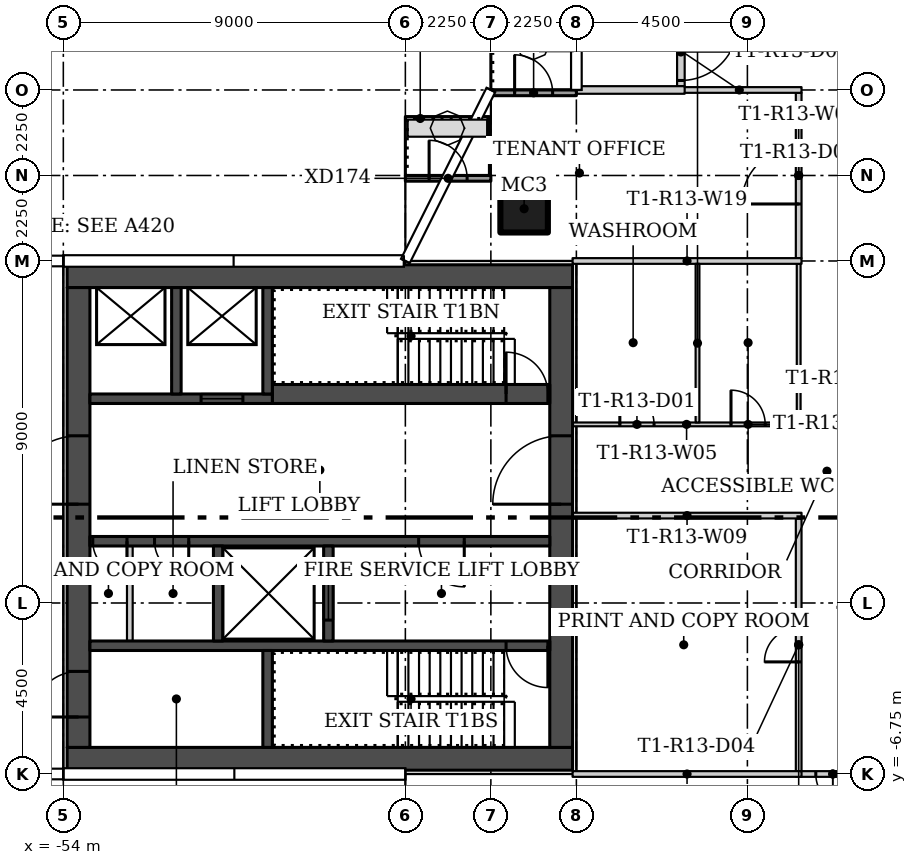
"""IFC4 building model, lengths in metres.
Left out: names, types, materials, properties, quantities, classifications, styles, units other than length and angle.
Written with IfcOpenShell. Run it as: python <this file> out.ifc"""

import sys

from ifc_helpers import new_model, si_unit, direction, frame, frame_2d, origin, origin_2d, place, context, subcontext, project, spatial, rectangle, hollow_rectangle, extrude, element, fill, save


model = new_model("IFC4")
c1 = context("Model", 3, precision=1e-05, world=origin(), true_north=direction((0.0, 1.0)))
c2 = subcontext(c1, "Body", "Model", "MODEL_VIEW")
j1 = project(units=[si_unit("LENGTHUNIT", "METRE"), si_unit("PLANEANGLEUNIT", "RADIAN")], contexts=[c1])
p1 = place(None, origin())
s1 = spatial("IfcSite", under=j1, at=p1, CompositionType="ELEMENT")
p2 = place(p1, origin())
s2 = spatial("IfcBuilding", under=s1, at=p2, CompositionType="ELEMENT")
p3 = place(p2, frame((0.0, 0.0, 120.9)))
s3 = spatial("IfcBuildingStorey", under=s2, at=p3, CompositionType="ELEMENT", Elevation=120.9)
p4 = place(p3, frame((-41.875, 8.125, 0.0)))
e1 = element("IfcColumn", 1, at=p4, inside=s3, PredefinedType="COLUMN", context=c2, shape_type="SweptSolid", body=[
    extrude(hollow_rectangle(XDim=1.25, YDim=1.25, WallThickness=0.05, at=origin_2d()), origin(), (0.0, 0.0, 1.0), 3.55),
])
p5 = place(p3, frame((-40.6, 2.45, 0.0)))
e2 = element("IfcWall", 2, at=p5, inside=s3, PredefinedType="PARTITIONING", context=c2, shape_type="SweptSolid", body=[
    extrude(rectangle(XDim=6.0, YDim=0.1, at=frame_2d((3.0, 0.0))), origin(), (0.0, 0.0, 1.0), 3.55),
])
p6 = place(p5, frame((1.244, 0.0, 0.0)))
e3 = element("IfcOpeningElement", 3, at=p6, cuts=e2, PredefinedType="OPENING", context=c2, shape_type="SweptSolid", body=[
    extrude(rectangle(XDim=0.9, YDim=2.1, at=frame_2d((0.45, 1.05))), frame((0.0, 0.06, 0.0), z_axis=(0.0, -1.0, 0.0), x_axis=(1.0, 0.0, 0.0)), (0.0, 0.0, 1.0), 0.12),
])
p7 = place(p5, frame((4.168, 0.0, 0.0)))
e4 = element("IfcOpeningElement", 4, at=p7, cuts=e2, PredefinedType="OPENING", context=c2, shape_type="SweptSolid", body=[
    extrude(rectangle(XDim=0.9, YDim=2.1, at=frame_2d((0.45, 1.05))), frame((0.0, 0.06, 0.0), z_axis=(0.0, -1.0, 0.0), x_axis=(1.0, 0.0, 0.0)), (0.0, 0.0, 1.0), 0.12),
])
p8 = place(p3, frame((-34.65, 2.5, 0.0), z_axis=(0.0, 0.0, 1.0), x_axis=(0.0, 1.0, 0.0)))
e5 = element("IfcWall", 5, at=p8, inside=s3, PredefinedType="PARTITIONING", context=c2, shape_type="SweptSolid", body=[
    extrude(rectangle(XDim=4.175, YDim=0.1, at=frame_2d((2.087, 0.0))), origin(), (0.0, 0.0, 1.0), 3.55),
])
p9 = place(p3, frame((-34.65, -6.675, 0.0), z_axis=(0.0, 0.0, 1.0), x_axis=(0.0, 1.0, 0.0)))
e6 = element("IfcWall", 6, at=p9, inside=s3, PredefinedType="PARTITIONING", context=c2, shape_type="SweptSolid", body=[
    extrude(rectangle(XDim=6.65, YDim=0.15, at=frame_2d((3.325, 0.0))), origin(), (0.0, 0.0, 1.0), 3.55),
])
p10 = place(p9, frame((2.875, 0.0, 0.0)))
e7 = element("IfcOpeningElement", 7, at=p10, cuts=e6, PredefinedType="OPENING", context=c2, shape_type="SweptSolid", body=[
    extrude(rectangle(XDim=0.9, YDim=2.1, at=frame_2d((0.45, 1.05))), frame((0.0, 0.085, 0.0), z_axis=(0.0, -1.0, 0.0), x_axis=(1.0, 0.0, 0.0)), (0.0, 0.0, 1.0), 0.17),
])
p11 = place(p3, frame((-34.65, 6.825, 0.0), z_axis=(0.0, 0.0, 1.0), x_axis=(0.0, 1.0, 0.0)))
e8 = element("IfcWall", 8, at=p11, inside=s3, PredefinedType="PARTITIONING", context=c2, shape_type="SweptSolid", body=[
    extrude(rectangle(XDim=4.35, YDim=0.15, at=frame_2d((2.175, 0.0))), origin(), (0.0, 0.0, 1.0), 3.55),
])
p12 = place(p11, frame((1.425, 0.0, 0.0)))
e9 = element("IfcOpeningElement", 9, at=p12, cuts=e8, PredefinedType="OPENING", context=c2, shape_type="SweptSolid", body=[
    extrude(rectangle(XDim=1.5, YDim=2.1, at=frame_2d((0.75, 1.05))), frame((0.0, 0.085, 0.0), z_axis=(0.0, -1.0, 0.0), x_axis=(1.0, 0.0, 0.0)), (0.0, 0.0, 1.0), 0.17),
])
p13 = place(p3, frame((-34.575, 0.05, 0.0), z_axis=(0.0, 0.0, 1.0), x_axis=(-1.0, 0.0, 0.0)))
e10 = element("IfcWall", 10, at=p13, inside=s3, PredefinedType="PARTITIONING", context=c2, shape_type="SweptSolid", body=[
    extrude(rectangle(XDim=6.025, YDim=0.15, at=frame_2d((3.012, 0.0))), origin(), (0.0, 0.0, 1.0), 3.55),
])
p14 = place(p3, frame((-34.575, 11.25, 0.0), z_axis=(0.0, 0.0, 1.0), x_axis=(-1.0, 0.0, 0.0)))
e11 = element("IfcWall", 11, at=p14, inside=s3, PredefinedType="PARTITIONING", context=c2, shape_type="SweptSolid", body=[
    extrude(rectangle(XDim=3.275, YDim=0.15, at=frame_2d((1.637, 0.0))), origin(), (0.0, 0.0, 1.0), 3.55),
])
p15 = place(p3, frame((-37.75, 13.15, 0.0), z_axis=(0.0, 0.0, 1.0), x_axis=(0.0, -1.0, 0.0)))
e12 = element("IfcWall", 12, at=p15, inside=s3, PredefinedType="PARTITIONING", context=c2, shape_type="SweptSolid", body=[
    extrude(rectangle(XDim=1.8, YDim=0.2, at=frame_2d((0.9, 0.0))), origin(), (0.0, 0.0, 1.0), 3.55),
])
p16 = place(p15, frame((0.15, 0.0, 0.0)))
e13 = element("IfcOpeningElement", 13, at=p16, cuts=e12, PredefinedType="OPENING", context=c2, shape_type="SweptSolid", body=[
    extrude(rectangle(XDim=1.5, YDim=2.4, at=frame_2d((0.75, 1.2))), frame((0.0, 0.11, 0.0), z_axis=(0.0, -1.0, 0.0), x_axis=(1.0, 0.0, 0.0)), (0.0, 0.0, 1.0), 0.22),
])
p17 = place(p3, frame((-32.787, -6.75, 0.0), z_axis=(0.0, 0.0, 1.0), x_axis=(-1.0, 0.0, 0.0)))
e14 = element("IfcWall", 14, at=p17, inside=s3, PredefinedType="PARTITIONING", context=c2, shape_type="SweptSolid", body=[
    extrude(rectangle(XDim=1.938, YDim=0.15, at=frame_2d((0.969, 0.0))), origin(), (0.0, 0.0, 1.0), 3.55),
])
p18 = place(p17, frame((0.513, 0.0, 0.0)))
e15 = element("IfcOpeningElement", 15, at=p18, cuts=e14, PredefinedType="OPENING", context=c2, shape_type="SweptSolid", body=[
    extrude(rectangle(XDim=0.9, YDim=2.1, at=frame_2d((0.45, 1.05))), frame((0.0, 0.085, 0.0), z_axis=(0.0, -1.0, 0.0), x_axis=(1.0, 0.0, 0.0)), (0.0, 0.0, 1.0), 0.17),
])
p19 = place(p3, frame((-34.575, 6.75, 0.0), z_axis=(0.0, 0.0, 1.0), x_axis=(-1.0, 0.0, 0.0)))
e16 = element("IfcWall", 16, at=p19, inside=s3, PredefinedType="PARTITIONING", context=c2, shape_type="SweptSolid", body=[
    extrude(rectangle(XDim=6.025, YDim=0.15, at=frame_2d((3.012, 0.0))), origin(), (0.0, 0.0, 1.0), 3.55),
])
p20 = place(p3, frame((-40.6, -6.75, 0.0)))
e17 = element("IfcWall", 17, at=p20, inside=s3, PredefinedType="PARTITIONING", context=c2, shape_type="SweptSolid", body=[
    extrude(rectangle(XDim=6.025, YDim=0.15, at=frame_2d((3.012, 0.0))), origin(), (0.0, 0.0, 1.0), 3.55),
])
p21 = place(p3, frame((-37.312, 2.5, 0.0), z_axis=(0.0, 0.0, 1.0), x_axis=(0.0, 1.0, 0.0)))
e18 = element("IfcWall", 18, at=p21, inside=s3, PredefinedType="PARTITIONING", context=c2, shape_type="SweptSolid", body=[
    extrude(rectangle(XDim=4.175, YDim=0.1, at=frame_2d((2.087, 0.0))), origin(), (0.0, 0.0, 1.0), 3.55),
])
p22 = place(p3, frame((-37.65, 11.25, 0.0), z_axis=(0.0, 0.0, 1.0), x_axis=(-1.0, 0.0, 0.0)))
e19 = element("IfcWall", 19, at=p22, inside=s3, PredefinedType="PARTITIONING", context=c2, shape_type="SweptSolid", body=[
    extrude(rectangle(XDim=2.85, YDim=0.2, at=frame_2d((1.425, 0.0))), origin(), (0.0, 0.0, 1.0), 3.55),
])
p23 = place(p3, frame((-42.75, 11.175, 0.0)))
e20 = element("IfcWall", 20, at=p23, inside=s3, PredefinedType="SOLIDWALL", context=c2, shape_type="SweptSolid", body=[
    extrude(rectangle(XDim=2.25, YDim=0.15, at=frame_2d((1.125, 0.0))), origin(), (0.0, 0.0, 1.0), 3.45),
])
p24 = place(p23, frame((0.625, 0.0, 0.0)))
e21 = element("IfcOpeningElement", 21, at=p24, cuts=e20, PredefinedType="OPENING", context=c2, shape_type="SweptSolid", body=[
    extrude(rectangle(XDim=1.0, YDim=2.4, at=frame_2d((0.5, 1.2))), frame((0.0, 0.085, 0.0), z_axis=(0.0, -1.0, 0.0), x_axis=(1.0, 0.0, 0.0)), (0.0, 0.0, 1.0), 0.17),
])
p25 = place(p3, frame((-45.0, 8.925, 0.0)))
e22 = element("IfcWall", 22, at=p25, inside=s3, PredefinedType="SOLIDWALL", context=c2, shape_type="SweptSolid", body=[
    extrude(rectangle(XDim=2.25, YDim=0.15, at=frame_2d((1.125, 0.0))), origin(), (0.0, 0.0, 1.0), 3.45),
])
p26 = place(p25, frame((0.625, 0.0, 0.0)))
e23 = element("IfcOpeningElement", 23, at=p26, cuts=e22, PredefinedType="OPENING", context=c2, shape_type="SweptSolid", body=[
    extrude(rectangle(XDim=1.0, YDim=2.4, at=frame_2d((0.5, 1.2))), frame((0.0, 0.085, 0.0), z_axis=(0.0, -1.0, 0.0), x_axis=(1.0, 0.0, 0.0)), (0.0, 0.0, 1.0), 0.17),
])
for number, where, z_axis, x_axis in (
    (24, (-40.6, -6.35, 0.0), (0.0, 0.0, 1.0), (-1.0, 0.0, 0.0)),
    (25, (-40.6, 6.35, 0.0), (0.0, 0.0, 1.0), (-1.0, 0.0, 0.0)),
):
    element("IfcWall", number, at=place(p3, frame(where, z_axis=z_axis, x_axis=x_axis)), inside=s3, PredefinedType="SHEAR", context=c2, shape_type="SweptSolid", body=[
        extrude(rectangle(XDim=13.3, YDim=0.6, at=frame_2d((6.65, 0.0))), origin(), (0.0, 0.0, 1.0), 3.55),
    ])
p27 = place(p3, frame((-40.9, -6.05, 0.0), z_axis=(0.0, 0.0, 1.0), x_axis=(0.0, 1.0, 0.0)))
e26 = element("IfcWall", 26, at=p27, inside=s3, PredefinedType="SHEAR", context=c2, shape_type="SweptSolid", body=[
    extrude(rectangle(XDim=12.1, YDim=0.6, at=frame_2d((6.05, 0.0))), origin(), (0.0, 0.0, 1.0), 3.55),
])
p28 = place(p27, frame((6.4, 0.0, 0.0)))
e27 = element("IfcOpeningElement", 27, at=p28, cuts=e26, PredefinedType="OPENING", context=c2, shape_type="SweptSolid", body=[
    extrude(rectangle(XDim=1.8, YDim=2.4, at=frame_2d((0.9, 1.2))), frame((0.0, 0.31, 0.0), z_axis=(0.0, -1.0, 0.0), x_axis=(1.0, 0.0, 0.0)), (0.0, 0.0, 1.0), 0.62),
])
p29 = place(p3, frame((-53.6, -6.05, 0.0), z_axis=(0.0, 0.0, 1.0), x_axis=(0.0, 1.0, 0.0)))
e28 = element("IfcWall", 28, at=p29, inside=s3, PredefinedType="SHEAR", context=c2, shape_type="SweptSolid", body=[
    extrude(rectangle(XDim=12.1, YDim=0.6, at=frame_2d((6.05, 0.0))), origin(), (0.0, 0.0, 1.0), 3.55),
])
p30 = place(p29, frame((0.8, 0.0, 0.0)))
e29 = element("IfcOpeningElement", 29, at=p30, cuts=e28, PredefinedType="OPENING", context=c2, shape_type="SweptSolid", body=[
    extrude(rectangle(XDim=1.2, YDim=2.1, at=frame_2d((0.6, 1.05))), frame((0.0, 0.31, 0.0), z_axis=(0.0, -1.0, 0.0), x_axis=(1.0, 0.0, 0.0)), (0.0, 0.0, 1.0), 0.62),
])
p31 = place(p29, frame((6.4, 0.0, 0.0)))
e30 = element("IfcOpeningElement", 30, at=p31, cuts=e28, PredefinedType="OPENING", context=c2, shape_type="SweptSolid", body=[
    extrude(rectangle(XDim=1.8, YDim=2.4, at=frame_2d((0.9, 1.2))), frame((0.0, 0.31, 0.0), z_axis=(0.0, -1.0, 0.0), x_axis=(1.0, 0.0, 0.0)), (0.0, 0.0, 1.0), 0.62),
])
p32 = place(p3, frame((-41.2, -3.375, 0.0), z_axis=(0.0, 0.0, 1.0), x_axis=(-1.0, 0.0, 0.0)))
e31 = element("IfcWall", 31, at=p32, inside=s3, PredefinedType="SHEAR", context=c2, shape_type="SweptSolid", body=[
    extrude(rectangle(XDim=12.1, YDim=0.25, at=frame_2d((6.05, 0.0))), origin(), (0.0, 0.0, 1.0), 3.55),
])
p33 = place(p32, frame((0.05, 0.0, 0.0)))
e32 = element("IfcOpeningElement", 32, at=p33, cuts=e31, PredefinedType="OPENING", context=c2, shape_type="SweptSolid", body=[
    extrude(rectangle(XDim=1.1, YDim=2.1, at=frame_2d((0.55, 1.05))), frame((0.0, 0.135, 0.0), z_axis=(0.0, -1.0, 0.0), x_axis=(1.0, 0.0, 0.0)), (0.0, 0.0, 1.0), 0.27),
])
p34 = place(p3, frame((-48.625, -6.05, 0.0), z_axis=(0.0, 0.0, 1.0), x_axis=(0.0, 1.0, 0.0)))
e33 = element("IfcWall", 33, at=p34, inside=s3, PredefinedType="SHEAR", context=c2, shape_type="SweptSolid", body=[
    extrude(rectangle(XDim=2.55, YDim=0.25, at=frame_2d((1.275, 0.0))), origin(), (0.0, 0.0, 1.0), 3.55),
])
p35 = place(p3, frame((-41.2, -0.625, 0.0), z_axis=(0.0, 0.0, 1.0), x_axis=(-1.0, 0.0, 0.0)))
e34 = element("IfcWall", 34, at=p35, inside=s3, PredefinedType="SHEAR", context=c2, shape_type="SweptSolid", body=[
    extrude(rectangle(XDim=12.1, YDim=0.25, at=frame_2d((6.05, 0.0))), origin(), (0.0, 0.0, 1.0), 3.55),
])
p36 = place(p35, frame((2.25, 0.0, 0.0)))
e35 = element("IfcOpeningElement", 35, at=p36, cuts=e34, PredefinedType="OPENING", context=c2, shape_type="SweptSolid", body=[
    extrude(rectangle(XDim=1.2, YDim=2.1, at=frame_2d((0.6, 1.05))), frame((0.0, 0.135, 0.0), z_axis=(0.0, -1.0, 0.0), x_axis=(1.0, 0.0, 0.0)), (0.0, 0.0, 1.0), 0.27),
])
p37 = place(p35, frame((9.5, 0.0, 0.0)))
e36 = element("IfcOpeningElement", 36, at=p37, cuts=e34, PredefinedType="OPENING", context=c2, shape_type="SweptSolid", body=[
    extrude(rectangle(XDim=0.9, YDim=2.1, at=frame_2d((0.45, 1.05))), frame((0.0, 0.135, 0.0), z_axis=(0.0, -1.0, 0.0), x_axis=(1.0, 0.0, 0.0)), (0.0, 0.0, 1.0), 0.27),
])
p38 = place(p35, frame((11.125, 0.0, 0.0)))
e37 = element("IfcOpeningElement", 37, at=p38, cuts=e34, PredefinedType="OPENING", context=c2, shape_type="SweptSolid", body=[
    extrude(rectangle(XDim=0.9, YDim=2.1, at=frame_2d((0.45, 1.05))), frame((0.0, 0.135, 0.0), z_axis=(0.0, -1.0, 0.0), x_axis=(1.0, 0.0, 0.0)), (0.0, 0.0, 1.0), 0.27),
])
p39 = place(p3, frame((-47.025, -3.25, 0.0), z_axis=(0.0, 0.0, 1.0), x_axis=(0.0, 1.0, 0.0)))
e38 = element("IfcWall", 38, at=p39, inside=s3, PredefinedType="SHEAR", context=c2, shape_type="SweptSolid", body=[
    extrude(rectangle(XDim=2.5, YDim=0.25, at=frame_2d((1.25, 0.0))), origin(), (0.0, 0.0, 1.0), 3.55),
])
p40 = place(p39, frame((0.55, 0.0, 0.0)))
e39 = element("IfcOpeningElement", 39, at=p40, cuts=e38, PredefinedType="OPENING", context=c2, shape_type="SweptSolid", body=[
    extrude(rectangle(XDim=1.4, YDim=2.4, at=frame_2d((0.7, 1.2))), frame((0.0, 0.135, 0.0), z_axis=(0.0, -1.0, 0.0), x_axis=(1.0, 0.0, 0.0)), (0.0, 0.0, 1.0), 0.27),
])
p41 = place(p3, frame((-49.925, -3.25, 0.0), z_axis=(0.0, 0.0, 1.0), x_axis=(0.0, 1.0, 0.0)))
e40 = element("IfcWall", 40, at=p41, inside=s3, PredefinedType="SHEAR", context=c2, shape_type="SweptSolid", body=[
    extrude(rectangle(XDim=2.5, YDim=0.25, at=frame_2d((1.25, 0.0))), origin(), (0.0, 0.0, 1.0), 3.55),
])
p42 = place(p3, frame((-52.25, -3.25, 0.0), z_axis=(0.0, 0.0, 1.0), x_axis=(0.0, 1.0, 0.0)))
e41 = element("IfcWall", 41, at=p42, inside=s3, PredefinedType="PARTITIONING", context=c2, shape_type="SweptSolid", body=[
    extrude(rectangle(XDim=2.5, YDim=0.15, at=frame_2d((1.25, 0.0))), origin(), (0.0, 0.0, 1.0), 3.55),
])
p43 = place(p3, frame((-48.5, 3.25, 0.0)))
e42 = element("IfcWall", 42, at=p43, inside=s3, PredefinedType="SHEAR", context=c2, shape_type="SweptSolid", body=[
    extrude(rectangle(XDim=7.3, YDim=0.5, at=frame_2d((3.65, 0.0))), origin(), (0.0, 0.0, 1.0), 3.55),
])
p44 = place(p43, frame((6.15, 0.0, 0.0)))
e43 = element("IfcOpeningElement", 43, at=p44, cuts=e42, PredefinedType="OPENING", context=c2, shape_type="SweptSolid", body=[
    extrude(rectangle(XDim=1.1, YDim=2.1, at=frame_2d((0.55, 1.05))), frame((0.0, 0.26, 0.0), z_axis=(0.0, -1.0, 0.0), x_axis=(1.0, 0.0, 0.0)), (0.0, 0.0, 1.0), 0.52),
])
p45 = place(p3, frame((-48.5, 3.125, 0.0), z_axis=(0.0, 0.0, 1.0), x_axis=(-1.0, 0.0, 0.0)))
e44 = element("IfcWall", 44, at=p45, inside=s3, PredefinedType="SHEAR", context=c2, shape_type="SweptSolid", body=[
    extrude(rectangle(XDim=4.8, YDim=0.25, at=frame_2d((2.4, 0.0))), origin(), (0.0, 0.0, 1.0), 3.55),
])
p46 = place(p45, frame((0.775, 0.0, 0.0)))
e45 = element("IfcOpeningElement", 45, at=p46, cuts=e44, PredefinedType="OPENING", context=c2, shape_type="SweptSolid", body=[
    extrude(rectangle(XDim=1.1, YDim=2.1, at=frame_2d((0.55, 1.05))), frame((0.0, 0.135, 0.0), z_axis=(0.0, -1.0, 0.0), x_axis=(1.0, 0.0, 0.0)), (0.0, 0.0, 1.0), 0.27),
])
for number, where, z_axis, x_axis in (
    (46, (-48.625, 3.25, 0.0), (0.0, 0.0, 1.0), (0.0, 1.0, 0.0)),
    (47, (-51.025, 3.25, 0.0), (0.0, 0.0, 1.0), (0.0, 1.0, 0.0)),
):
    element("IfcWall", number, at=place(p3, frame(where, z_axis=z_axis, x_axis=x_axis)), inside=s3, PredefinedType="SHEAR", context=c2, shape_type="SweptSolid", body=[
        extrude(rectangle(XDim=2.8, YDim=0.25, at=frame_2d((1.4, 0.0))), origin(), (0.0, 0.0, 1.0), 3.55),
    ])
p47 = place(p6, origin())
e48 = element("IfcDoor", 48, at=p47, inside=s3, OperationType="SINGLE_SWING_LEFT", PredefinedType="DOOR", context=c2, shape_type="SweptSolid", body=[
    extrude(rectangle(XDim=0.9, YDim=2.1, at=frame_2d((0.45, 1.05))), frame((0.0, 0.025, 0.0), z_axis=(0.0, -1.0, 0.0), x_axis=(1.0, 0.0, 0.0)), (0.0, 0.0, 1.0), 0.05),
])
fill(e3, e48)
p48 = place(p7, origin())
e49 = element("IfcDoor", 49, at=p48, inside=s3, OperationType="SINGLE_SWING_LEFT", PredefinedType="DOOR", context=c2, shape_type="SweptSolid", body=[
    extrude(rectangle(XDim=0.9, YDim=2.1, at=frame_2d((0.45, 1.05))), frame((0.0, 0.025, 0.0), z_axis=(0.0, -1.0, 0.0), x_axis=(1.0, 0.0, 0.0)), (0.0, 0.0, 1.0), 0.05),
])
fill(e4, e49)
p49 = place(p16, origin())
e50 = element("IfcDoor", 50, at=p49, inside=s3, OperationType="DOUBLE_DOOR_SINGLE_SWING", PredefinedType="DOOR", context=c2, shape_type="SweptSolid", body=[
    extrude(rectangle(XDim=1.5, YDim=2.4, at=frame_2d((0.75, 1.2))), frame((0.0, 0.025, 0.0), z_axis=(0.0, -1.0, 0.0), x_axis=(1.0, 0.0, 0.0)), (0.0, 0.0, 1.0), 0.05),
])
fill(e13, e50)
p50 = place(p10, origin())
e51 = element("IfcDoor", 51, at=p50, inside=s3, OperationType="SINGLE_SWING_RIGHT", PredefinedType="DOOR", context=c2, shape_type="SweptSolid", body=[
    extrude(rectangle(XDim=0.9, YDim=2.1, at=frame_2d((0.45, 1.05))), frame((0.0, 0.025, 0.0), z_axis=(0.0, -1.0, 0.0), x_axis=(1.0, 0.0, 0.0)), (0.0, 0.0, 1.0), 0.05),
])
fill(e7, e51)
p51 = place(p12, origin())
e52 = element("IfcDoor", 52, at=p51, inside=s3, OperationType="DOUBLE_DOOR_SINGLE_SWING", PredefinedType="DOOR", context=c2, shape_type="SweptSolid", body=[
    extrude(rectangle(XDim=1.5, YDim=2.1, at=frame_2d((0.75, 1.05))), frame((0.0, 0.025, 0.0), z_axis=(0.0, -1.0, 0.0), x_axis=(1.0, 0.0, 0.0)), (0.0, 0.0, 1.0), 0.05),
])
fill(e9, e52)
p52 = place(p18, origin())
e53 = element("IfcDoor", 53, at=p52, inside=s3, OperationType="SINGLE_SWING_RIGHT", PredefinedType="DOOR", context=c2, shape_type="SweptSolid", body=[
    extrude(rectangle(XDim=0.9, YDim=2.1, at=frame_2d((0.45, 1.05))), frame((0.0, 0.025, 0.0), z_axis=(0.0, -1.0, 0.0), x_axis=(1.0, 0.0, 0.0)), (0.0, 0.0, 1.0), 0.05),
])
fill(e15, e53)
p53 = place(p24, origin())
e54 = element("IfcDoor", 54, at=p53, inside=s3, OperationType="SINGLE_SWING_LEFT", PredefinedType="DOOR", context=c2, shape_type="SweptSolid", body=[
    extrude(rectangle(XDim=1.0, YDim=2.4, at=frame_2d((0.5, 1.2))), frame((0.0, 0.025, 0.0), z_axis=(0.0, -1.0, 0.0), x_axis=(1.0, 0.0, 0.0)), (0.0, 0.0, 1.0), 0.05),
])
fill(e21, e54)
p54 = place(p26, origin())
e55 = element("IfcDoor", 55, at=p54, inside=s3, OperationType="SINGLE_SWING_RIGHT", PredefinedType="DOOR", context=c2, shape_type="SweptSolid", body=[
    extrude(rectangle(XDim=1.0, YDim=2.4, at=frame_2d((0.5, 1.2))), frame((0.0, 0.025, 0.0), z_axis=(0.0, -1.0, 0.0), x_axis=(1.0, 0.0, 0.0)), (0.0, 0.0, 1.0), 0.05),
])
fill(e23, e55)
p55 = place(p28, origin())
e56 = element("IfcDoor", 56, at=p55, inside=s3, OperationType="DOUBLE_DOOR_SINGLE_SWING", PredefinedType="DOOR", context=c2, shape_type="SweptSolid", body=[
    extrude(rectangle(XDim=1.8, YDim=2.4, at=frame_2d((0.9, 1.2))), frame((0.0, 0.025, 0.0), z_axis=(0.0, -1.0, 0.0), x_axis=(1.0, 0.0, 0.0)), (0.0, 0.0, 1.0), 0.05),
])
fill(e27, e56)
p56 = place(p30, origin())
e57 = element("IfcDoor", 57, at=p56, inside=s3, OperationType="SINGLE_SWING_LEFT", PredefinedType="DOOR", context=c2, shape_type="SweptSolid", body=[
    extrude(rectangle(XDim=1.2, YDim=2.1, at=frame_2d((0.6, 1.05))), frame((0.0, 0.025, 0.0), z_axis=(0.0, -1.0, 0.0), x_axis=(1.0, 0.0, 0.0)), (0.0, 0.0, 1.0), 0.05),
])
fill(e29, e57)
p57 = place(p31, origin())
e58 = element("IfcDoor", 58, at=p57, inside=s3, OperationType="DOUBLE_DOOR_SINGLE_SWING", PredefinedType="DOOR", context=c2, shape_type="SweptSolid", body=[
    extrude(rectangle(XDim=1.8, YDim=2.4, at=frame_2d((0.9, 1.2))), frame((0.0, 0.025, 0.0), z_axis=(0.0, -1.0, 0.0), x_axis=(1.0, 0.0, 0.0)), (0.0, 0.0, 1.0), 0.05),
])
fill(e30, e58)
p58 = place(p33, origin())
e59 = element("IfcDoor", 59, at=p58, inside=s3, OperationType="SINGLE_SWING_LEFT", PredefinedType="DOOR", context=c2, shape_type="SweptSolid", body=[
    extrude(rectangle(XDim=1.1, YDim=2.1, at=frame_2d((0.55, 1.05))), frame((0.0, 0.025, 0.0), z_axis=(0.0, -1.0, 0.0), x_axis=(1.0, 0.0, 0.0)), (0.0, 0.0, 1.0), 0.05),
])
fill(e32, e59)
p59 = place(p36, origin())
e60 = element("IfcDoor", 60, at=p59, inside=s3, OperationType="SINGLE_SWING_LEFT", PredefinedType="DOOR", context=c2, shape_type="SweptSolid", body=[
    extrude(rectangle(XDim=1.2, YDim=2.1, at=frame_2d((0.6, 1.05))), frame((0.0, 0.025, 0.0), z_axis=(0.0, -1.0, 0.0), x_axis=(1.0, 0.0, 0.0)), (0.0, 0.0, 1.0), 0.05),
])
fill(e35, e60)
p60 = place(p37, origin())
e61 = element("IfcDoor", 61, at=p60, inside=s3, OperationType="SINGLE_SWING_RIGHT", PredefinedType="DOOR", context=c2, shape_type="SweptSolid", body=[
    extrude(rectangle(XDim=0.9, YDim=2.1, at=frame_2d((0.45, 1.05))), frame((0.0, 0.025, 0.0), z_axis=(0.0, -1.0, 0.0), x_axis=(1.0, 0.0, 0.0)), (0.0, 0.0, 1.0), 0.05),
])
fill(e36, e61)
p61 = place(p38, origin())
e62 = element("IfcDoor", 62, at=p61, inside=s3, OperationType="SINGLE_SWING_RIGHT", PredefinedType="DOOR", context=c2, shape_type="SweptSolid", body=[
    extrude(rectangle(XDim=0.9, YDim=2.1, at=frame_2d((0.45, 1.05))), frame((0.0, 0.025, 0.0), z_axis=(0.0, -1.0, 0.0), x_axis=(1.0, 0.0, 0.0)), (0.0, 0.0, 1.0), 0.05),
])
fill(e37, e62)
p62 = place(p40, origin())
e63 = element("IfcDoor", 63, at=p62, inside=s3, OperationType="SLIDING_TO_LEFT", PredefinedType="DOOR", context=c2, shape_type="SweptSolid", body=[
    extrude(rectangle(XDim=1.4, YDim=2.4, at=frame_2d((0.7, 1.2))), frame((0.0, 0.025, 0.0), z_axis=(0.0, -1.0, 0.0), x_axis=(1.0, 0.0, 0.0)), (0.0, 0.0, 1.0), 0.05),
])
fill(e39, e63)
p63 = place(p44, origin())
e64 = element("IfcDoor", 64, at=p63, inside=s3, OperationType="SINGLE_SWING_RIGHT", PredefinedType="DOOR", context=c2, shape_type="SweptSolid", body=[
    extrude(rectangle(XDim=1.1, YDim=2.1, at=frame_2d((0.55, 1.05))), frame((0.0, 0.025, 0.0), z_axis=(0.0, -1.0, 0.0), x_axis=(1.0, 0.0, 0.0)), (0.0, 0.0, 1.0), 0.05),
])
fill(e43, e64)
p64 = place(p46, origin())
e65 = element("IfcDoor", 65, at=p64, inside=s3, OperationType="SLIDING_TO_LEFT", PredefinedType="DOOR", context=c2, shape_type="SweptSolid", body=[
    extrude(rectangle(XDim=1.1, YDim=2.1, at=frame_2d((0.55, 1.05))), frame((0.0, 0.025, 0.0), z_axis=(0.0, -1.0, 0.0), x_axis=(1.0, 0.0, 0.0)), (0.0, 0.0, 1.0), 0.05),
])
fill(e45, e65)
save(model, sys.argv[1])
